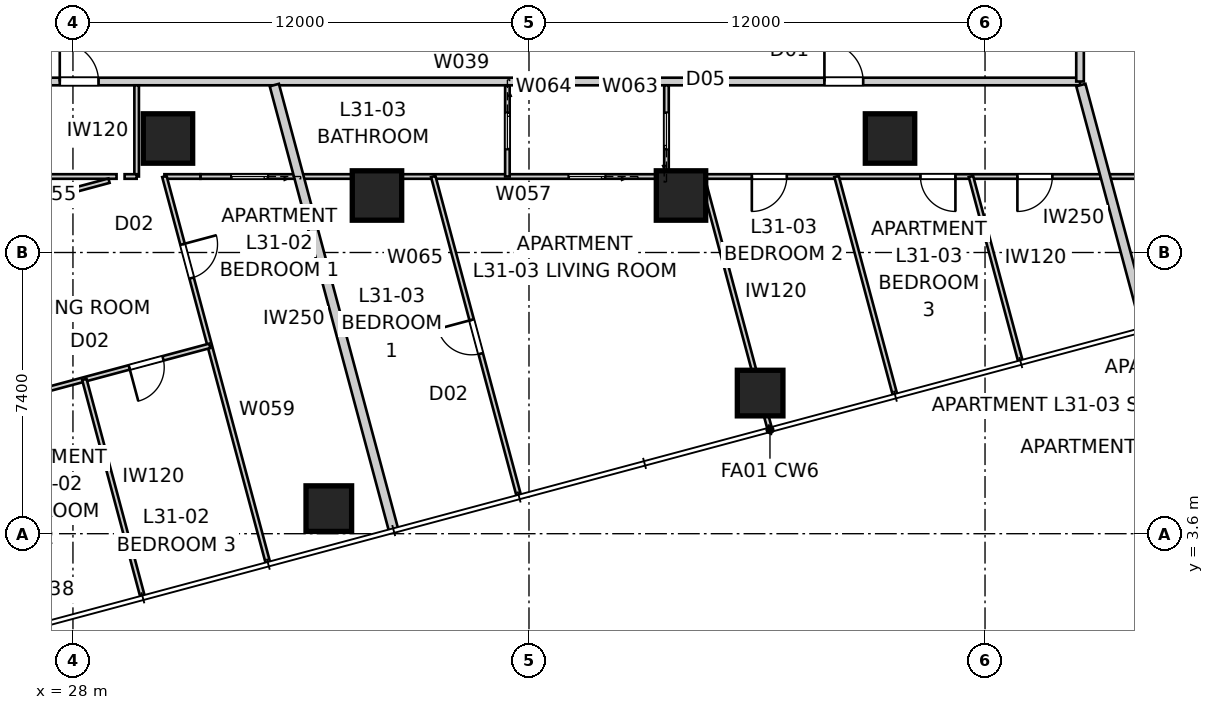
"""IFC4 building model, lengths in metres.
Left out: names, types, materials, properties, quantities, classifications, styles, units other than length and angle.
Written with IfcOpenShell. Run it as: python <this file> out.ifc"""

import sys

from ifc_helpers import new_model, si_unit, direction, frame, frame_2d, origin, origin_2d, place, context, subcontext, project, spatial, rectangle, extrude, element, fill, save


model = new_model("IFC4")
c1 = context("Model", 3, precision=1e-05, world=origin(), true_north=direction((0.0, 1.0)))
c2 = subcontext(c1, "Body", "Model", "MODEL_VIEW")
j1 = project(units=[si_unit("LENGTHUNIT", "METRE"), si_unit("PLANEANGLEUNIT", "RADIAN")], contexts=[c1])
p1 = place(None, origin())
s1 = spatial("IfcSite", under=j1, at=p1, CompositionType="ELEMENT")
p2 = place(p1, origin())
s2 = spatial("IfcBuilding", under=s1, at=p2, CompositionType="ELEMENT")
p3 = place(p2, frame((0.0, 0.0, 115.0)))
s3 = spatial("IfcBuildingStorey", under=s2, at=p3, CompositionType="ELEMENT", Elevation=115.0)
for number, where, z_axis, x_axis in (
    (1, (34.733, 4.26, 0.0), (0.0, 0.0, 1.0), (1.0, 0.0, 0.0)),
    (2, (46.082, 7.301, 0.0), (0.0, 0.0, 1.0), (1.0, 0.0, 0.0)),
):
    element("IfcColumn", number, at=place(p3, frame(where, z_axis=z_axis, x_axis=x_axis)), inside=s3, PredefinedType="COLUMN", context=c2, shape_type="SweptSolid", body=[
        extrude(rectangle(XDim=1.2, YDim=1.2, at=origin_2d()), origin(), (0.0, 0.0, 1.0), 3.4),
    ])
for number, where, z_axis, x_axis in (
    (3, (30.5, 14.0, 0.0), (0.0, 0.0, 1.0), (1.0, 0.0, 0.0)),
    (4, (36.0, 12.5, 0.0), (0.0, 0.0, 1.0), (1.0, 0.0, 0.0)),
    (5, (44.0, 12.5, 0.0), (0.0, 0.0, 1.0), (1.0, 0.0, 0.0)),
    (6, (49.5, 14.0, 0.0), (0.0, 0.0, 1.0), (1.0, 0.0, 0.0)),
):
    element("IfcColumn", number, at=place(p3, frame(where, z_axis=z_axis, x_axis=x_axis)), inside=s3, PredefinedType="COLUMN", context=c2, shape_type="SweptSolid", body=[
        extrude(rectangle(XDim=1.3, YDim=1.3, at=origin_2d()), origin(), (0.0, 0.0, 1.0), 3.4),
    ])
p4 = place(p3, frame((26.3, 15.5, 0.0), z_axis=(0.0, 0.0, 1.0), x_axis=(1.0, 0.0, 0.0)))
e7 = element("IfcWall", 7, at=p4, inside=s3, PredefinedType="PARTITIONING", context=c2, shape_type="SweptSolid", body=[
    extrude(rectangle(XDim=28.2, YDim=0.2, at=frame_2d((14.1, 0.0))), origin(), (0.0, 0.0, 1.0), 3.25),
])
p5 = place(p4, frame((21.474, 0.0, 0.0)))
e8 = element("IfcOpeningElement", 8, at=p5, cuts=e7, PredefinedType="OPENING", context=c2, shape_type="SweptSolid", body=[
    extrude(rectangle(XDim=1.02, YDim=2.34, at=frame_2d((0.51, 1.17))), frame((0.0, 0.11, 0.0), z_axis=(0.0, -1.0, 0.0), x_axis=(1.0, 0.0, 0.0)), (0.0, 0.0, 1.0), 0.22),
])
p6 = place(p4, frame((1.353, 0.0, 0.0)))
e9 = element("IfcOpeningElement", 9, at=p6, cuts=e7, PredefinedType="OPENING", context=c2, shape_type="SweptSolid", body=[
    extrude(rectangle(XDim=1.02, YDim=2.1, at=frame_2d((0.51, 1.05))), frame((0.0, 0.11, 0.0), z_axis=(0.0, -1.0, 0.0), x_axis=(1.0, 0.0, 0.0)), (0.0, 0.0, 1.0), 0.22),
])
p7 = place(p3, frame((54.5, 15.5, 0.0), z_axis=(0.0, 0.0, 1.0), x_axis=(0.0, 1.0, 0.0)))
e10 = element("IfcWall", 10, at=p7, inside=s3, PredefinedType="PARTITIONING", context=c2, shape_type="SweptSolid", body=[
    extrude(rectangle(XDim=29.0, YDim=0.2, at=frame_2d((14.5, 0.0))), origin(), (0.0, 0.0, 1.0), 3.25),
])
p8 = place(p7, frame((24.76, 0.0, 0.0)))
e11 = element("IfcOpeningElement", 11, at=p8, cuts=e10, PredefinedType="OPENING", context=c2, shape_type="SweptSolid", body=[
    extrude(rectangle(XDim=1.02, YDim=2.1, at=frame_2d((0.51, 1.05))), frame((0.0, 0.11, 0.0), z_axis=(0.0, -1.0, 0.0), x_axis=(1.0, 0.0, 0.0)), (0.0, 0.0, 1.0), 0.22),
])
p9 = place(p7, frame((5.829, 0.0, 0.0)))
e12 = element("IfcOpeningElement", 12, at=p9, cuts=e10, PredefinedType="OPENING", context=c2, shape_type="SweptSolid", body=[
    extrude(rectangle(XDim=1.02, YDim=2.34, at=frame_2d((0.51, 1.17))), frame((0.0, 0.11, 0.0), z_axis=(0.0, -1.0, 0.0), x_axis=(1.0, 0.0, 0.0)), (0.0, 0.0, 1.0), 0.22),
])
p10 = place(p7, frame((9.559, 0.0, 0.0)))
e13 = element("IfcOpeningElement", 13, at=p10, cuts=e10, PredefinedType="OPENING", context=c2, shape_type="SweptSolid", body=[
    extrude(rectangle(XDim=1.02, YDim=2.34, at=frame_2d((0.51, 1.17))), frame((0.0, 0.11, 0.0), z_axis=(0.0, -1.0, 0.0), x_axis=(1.0, 0.0, 0.0)), (0.0, 0.0, 1.0), 0.22),
])
p11 = place(p3, frame((36.44, 3.682, 0.0), z_axis=(0.0, 0.0, 1.0), x_axis=(-0.258824223352, 0.965924438766, 0.0)))
e14 = element("IfcWall", 14, at=p11, inside=s3, PredefinedType="PARTITIONING", context=c2, shape_type="SweptSolid", body=[
    extrude(rectangle(XDim=12.138, YDim=0.25, at=frame_2d((6.069, 0.0))), origin(), (0.0, 0.0, 1.0), 3.25),
])
p12 = place(p3, frame((56.242, 8.988, 0.0), z_axis=(0.0, 0.0, 1.0), x_axis=(-0.25880587229, 0.965929355837, 0.0)))
e15 = element("IfcWall", 15, at=p12, inside=s3, PredefinedType="PARTITIONING", context=c2, shape_type="SweptSolid", body=[
    extrude(rectangle(XDim=6.645, YDim=0.25, at=frame_2d((3.322, 0.0))), origin(), (0.0, 0.0, 1.0), 3.25),
])
p13 = place(p3, frame((29.676, 15.4, 0.0), z_axis=(0.0, 0.0, 1.0), x_axis=(0.0, -1.0, 0.0)))
e16 = element("IfcWall", 16, at=p13, inside=s3, PredefinedType="PARTITIONING", context=c2, shape_type="SweptSolid", body=[
    extrude(rectangle(XDim=2.4, YDim=0.12, at=frame_2d((1.2, 0.0))), origin(), (0.0, 0.0, 1.0), 3.25),
])
p14 = place(p3, frame((29.147, 13.0, 0.0), z_axis=(0.0, 0.0, 1.0), x_axis=(-1.0, 0.0, 0.0)))
e17 = element("IfcWall", 17, at=p14, inside=s3, PredefinedType="PARTITIONING", context=c2, shape_type="SweptSolid", body=[
    extrude(rectangle(XDim=6.147, YDim=0.12, at=frame_2d((3.074, 0.0))), origin(), (0.0, 0.0, 1.0), 3.25),
])
p15 = place(p14, frame((3.591, 0.0, 0.0)))
e18 = element("IfcOpeningElement", 18, at=p15, cuts=e17, PredefinedType="OPENING", context=c2, shape_type="SweptSolid", body=[
    extrude(rectangle(XDim=0.96, YDim=2.1, at=frame_2d((0.48, 1.05))), frame((0.0, 0.07, 0.0), z_axis=(0.0, -1.0, 0.0), x_axis=(1.0, 0.0, 0.0)), (0.0, 0.0, 1.0), 0.14),
])
p16 = place(p3, frame((55.046, 13.0, 0.0), z_axis=(0.0, 0.0, 1.0), x_axis=(-1.0, 0.0, 0.0)))
e19 = element("IfcWall", 19, at=p16, inside=s3, PredefinedType="PARTITIONING", context=c2, shape_type="SweptSolid", body=[
    extrude(rectangle(XDim=23.693, YDim=0.12, at=frame_2d((11.846, 0.0))), origin(), (0.0, 0.0, 1.0), 2.55),
])
p17 = place(p16, frame((8.262, 0.0, 0.0)))
e20 = element("IfcOpeningElement", 20, at=p17, cuts=e19, PredefinedType="OPENING", context=c2, shape_type="SweptSolid", body=[
    extrude(rectangle(XDim=0.92, YDim=2.34, at=frame_2d((0.46, 1.17))), frame((0.0, 0.07, 0.0), z_axis=(0.0, -1.0, 0.0), x_axis=(1.0, 0.0, 0.0)), (0.0, 0.0, 1.0), 0.14),
])
p18 = place(p16, frame((3.825, 0.0, 0.0)))
e21 = element("IfcOpeningElement", 21, at=p18, cuts=e19, PredefinedType="OPENING", context=c2, shape_type="SweptSolid", body=[
    extrude(rectangle(XDim=0.92, YDim=2.34, at=frame_2d((0.46, 1.17))), frame((0.0, 0.07, 0.0), z_axis=(0.0, -1.0, 0.0), x_axis=(1.0, 0.0, 0.0)), (0.0, 0.0, 1.0), 0.14),
])
p19 = place(p16, frame((1.274, 0.0, 0.0)))
e22 = element("IfcOpeningElement", 22, at=p19, cuts=e19, PredefinedType="OPENING", context=c2, shape_type="SweptSolid", body=[
    extrude(rectangle(XDim=0.92, YDim=2.34, at=frame_2d((0.46, 1.17))), frame((0.0, 0.07, 0.0), z_axis=(0.0, -1.0, 0.0), x_axis=(1.0, 0.0, 0.0)), (0.0, 0.0, 1.0), 0.14),
])
p20 = place(p16, frame((13.041, 0.0, 0.0)))
e23 = element("IfcOpeningElement", 23, at=p20, cuts=e19, PredefinedType="OPENING", context=c2, shape_type="SweptSolid", body=[
    extrude(rectangle(XDim=0.96, YDim=2.1, at=frame_2d((0.48, 1.05))), frame((0.0, 0.07, 0.0), z_axis=(0.0, -1.0, 0.0), x_axis=(1.0, 0.0, 0.0)), (0.0, 0.0, 1.0), 0.14),
])
p21 = place(p16, frame((21.917, 0.0, 0.0)))
e24 = element("IfcOpeningElement", 24, at=p21, cuts=e19, PredefinedType="OPENING", context=c2, shape_type="SweptSolid", body=[
    extrude(rectangle(XDim=0.96, YDim=2.1, at=frame_2d((0.48, 1.05))), frame((0.0, 0.07, 0.0), z_axis=(0.0, -1.0, 0.0), x_axis=(1.0, 0.0, 0.0)), (0.0, 0.0, 1.0), 0.14),
])
p22 = place(p3, frame((30.406, 13.0, 0.0), z_axis=(0.0, 0.0, 1.0), x_axis=(0.258797552287, -0.965931585015, 0.0)))
e25 = element("IfcWall", 25, at=p22, inside=s3, PredefinedType="PARTITIONING", context=c2, shape_type="SweptSolid", body=[
    extrude(rectangle(XDim=10.522, YDim=0.12, at=frame_2d((5.261, 0.0))), origin(), (0.0, 0.0, 1.0), 2.722),
])
p23 = place(p22, frame((1.846, 0.0, 0.0)))
e26 = element("IfcOpeningElement", 26, at=p23, cuts=e25, PredefinedType="OPENING", context=c2, shape_type="SweptSolid", body=[
    extrude(rectangle(XDim=0.92, YDim=2.34, at=frame_2d((0.46, 1.17))), frame((0.0, 0.07, 0.0), z_axis=(0.0, -1.0, 0.0), x_axis=(1.0, 0.0, 0.0)), (0.0, 0.0, 1.0), 0.14),
])
p24 = place(p3, frame((31.6, 8.544, 0.0), z_axis=(0.0, 0.0, 1.0), x_axis=(-0.965927151587, -0.258814098973, 0.0)))
e27 = element("IfcWall", 27, at=p24, inside=s3, PredefinedType="PARTITIONING", context=c2, shape_type="SweptSolid", body=[
    extrude(rectangle(XDim=10.793, YDim=0.12, at=frame_2d((5.396, 0.0))), origin(), (0.0, 0.0, 1.0), 3.25),
])
p25 = place(p24, frame((6.64, 0.0, 0.0)))
e28 = element("IfcOpeningElement", 28, at=p25, cuts=e27, PredefinedType="OPENING", context=c2, shape_type="SweptSolid", body=[
    extrude(rectangle(XDim=0.92, YDim=2.34, at=frame_2d((0.46, 1.17))), frame((0.0, 0.07, 0.0), z_axis=(0.0, -1.0, 0.0), x_axis=(1.0, 0.0, 0.0)), (0.0, 0.0, 1.0), 0.14),
])
p26 = place(p24, frame((1.273, 0.0, 0.0)))
e29 = element("IfcOpeningElement", 29, at=p26, cuts=e27, PredefinedType="OPENING", context=c2, shape_type="SweptSolid", body=[
    extrude(rectangle(XDim=0.92, YDim=2.34, at=frame_2d((0.46, 1.17))), frame((0.0, 0.07, 0.0), z_axis=(0.0, -1.0, 0.0), x_axis=(1.0, 0.0, 0.0)), (0.0, 0.0, 1.0), 0.14),
])
p27 = place(p3, frame((19.911, 10.468, 0.0), z_axis=(0.0, 0.0, 1.0), x_axis=(0.965927203676, 0.25881390457, 0.0)))
e30 = element("IfcWall", 30, at=p27, inside=s3, PredefinedType="PARTITIONING", context=c2, shape_type="SweptSolid", body=[
    extrude(rectangle(XDim=9.357, YDim=0.12, at=frame_2d((4.678, 0.0))), origin(), (0.0, 0.0, 1.0), 2.638),
])
p28 = place(p27, frame((4.391, 0.0, 0.0)))
e31 = element("IfcOpeningElement", 31, at=p28, cuts=e30, PredefinedType="OPENING", context=c2, shape_type="SweptSolid", body=[
    extrude(rectangle(XDim=0.96, YDim=2.1, at=frame_2d((0.48, 1.05))), frame((0.0, 0.07, 0.0), z_axis=(0.0, -1.0, 0.0), x_axis=(1.0, 0.0, 0.0)), (0.0, 0.0, 1.0), 0.14),
])
p29 = place(p3, frame((28.3, 7.66, 0.0), z_axis=(0.0, 0.0, 1.0), x_axis=(0.25882212607, -0.965925000741, 0.0)))
e32 = element("IfcWall", 32, at=p29, inside=s3, PredefinedType="PARTITIONING", context=c2, shape_type="SweptSolid", body=[
    extrude(rectangle(XDim=5.91, YDim=0.12, at=frame_2d((2.955, 0.0))), origin(), (0.0, 0.0, 1.0), 3.25),
])
p30 = place(p3, frame((43.618, 13.0, 0.0), z_axis=(0.0, 0.0, 1.0), x_axis=(0.0, 1.0, 0.0)))
e33 = element("IfcWall", 33, at=p30, inside=s3, PredefinedType="PARTITIONING", context=c2, shape_type="SweptSolid", body=[
    extrude(rectangle(XDim=2.4, YDim=0.12, at=frame_2d((1.2, 0.0))), origin(), (0.0, 0.0, 1.0), 3.25),
])
p31 = place(p30, frame((0.72, 0.0, 0.0)))
e34 = element("IfcOpeningElement", 34, at=p31, cuts=e33, PredefinedType="OPENING", context=c2, shape_type="SweptSolid", body=[
    extrude(rectangle(XDim=0.96, YDim=2.1, at=frame_2d((0.48, 1.05))), frame((0.0, 0.07, 0.0), z_axis=(0.0, -1.0, 0.0), x_axis=(1.0, 0.0, 0.0)), (0.0, 0.0, 1.0), 0.14),
])
p32 = place(p3, frame((39.432, 15.4, 0.0), z_axis=(0.0, 0.0, 1.0), x_axis=(0.0, -1.0, 0.0)))
e35 = element("IfcWall", 35, at=p32, inside=s3, PredefinedType="PARTITIONING", context=c2, shape_type="SweptSolid", body=[
    extrude(rectangle(XDim=2.4, YDim=0.12, at=frame_2d((1.2, 0.0))), origin(), (0.0, 0.0, 1.0), 3.25),
])
p33 = place(p32, frame((0.72, 0.0, 0.0)))
e36 = element("IfcOpeningElement", 36, at=p33, cuts=e35, PredefinedType="OPENING", context=c2, shape_type="SweptSolid", body=[
    extrude(rectangle(XDim=0.96, YDim=2.1, at=frame_2d((0.48, 1.05))), frame((0.0, 0.07, 0.0), z_axis=(0.0, -1.0, 0.0), x_axis=(1.0, 0.0, 0.0)), (0.0, 0.0, 1.0), 0.14),
])
p34 = place(p3, frame((39.73, 4.605, 0.0), z_axis=(0.0, 0.0, 1.0), x_axis=(-0.258819860698, 0.965925607751, 0.0)))
e37 = element("IfcWall", 37, at=p34, inside=s3, PredefinedType="PARTITIONING", context=c2, shape_type="SweptSolid", body=[
    extrude(rectangle(XDim=8.691, YDim=0.12, at=frame_2d((4.346, 0.0))), origin(), (0.0, 0.0, 1.0), 3.25),
])
p35 = place(p34, frame((3.866, 0.0, 0.0)))
e38 = element("IfcOpeningElement", 38, at=p35, cuts=e37, PredefinedType="OPENING", context=c2, shape_type="SweptSolid", body=[
    extrude(rectangle(XDim=0.92, YDim=2.34, at=frame_2d((0.46, 1.17))), frame((0.0, 0.07, 0.0), z_axis=(0.0, -1.0, 0.0), x_axis=(1.0, 0.0, 0.0)), (0.0, 0.0, 1.0), 0.14),
])
p36 = place(p3, frame((44.555, 13.0, 0.0), z_axis=(0.0, 0.0, 1.0), x_axis=(0.258829770556, -0.965922952349, 0.0)))
e39 = element("IfcWall", 39, at=p36, inside=s3, PredefinedType="PARTITIONING", context=c2, shape_type="SweptSolid", body=[
    extrude(rectangle(XDim=6.86, YDim=0.12, at=frame_2d((3.43, 0.0))), origin(), (0.0, 0.0, 1.0), 3.25),
])
p37 = place(p3, frame((48.092, 13.0, 0.0), z_axis=(0.0, 0.0, 1.0), x_axis=(0.258812722515, -0.965927520399, 0.0)))
e40 = element("IfcWall", 40, at=p37, inside=s3, PredefinedType="PARTITIONING", context=c2, shape_type="SweptSolid", body=[
    extrude(rectangle(XDim=5.945, YDim=0.12, at=frame_2d((2.972, 0.0))), origin(), (0.0, 0.0, 1.0), 3.25),
])
p38 = place(p3, frame((51.63, 13.0, 0.0), z_axis=(0.0, 0.0, 1.0), x_axis=(0.258789467631, -0.965933751063, 0.0)))
e41 = element("IfcWall", 41, at=p38, inside=s3, PredefinedType="PARTITIONING", context=c2, shape_type="SweptSolid", body=[
    extrude(rectangle(XDim=5.029, YDim=0.12, at=frame_2d((2.515, 0.0))), origin(), (0.0, 0.0, 1.0), 3.25),
])
p39 = place(p3, frame((57.0, 13.0, 0.0), z_axis=(0.0, 0.0, 1.0), x_axis=(-1.0, 0.0, 0.0)))
e42 = element("IfcWall", 42, at=p39, inside=s3, PredefinedType="PARTITIONING", context=c2, shape_type="SweptSolid", body=[
    extrude(rectangle(XDim=1.833, YDim=0.12, at=frame_2d((0.917, 0.0))), origin(), (0.0, 0.0, 1.0), 3.25),
])
p40 = place(p3, frame((29.676, 13.0, 0.0), z_axis=(0.0, 0.0, 1.0), x_axis=(-1.0, 0.0, 0.0)))
e43 = element("IfcWall", 43, at=p40, inside=s3, PredefinedType="PARTITIONING", context=c2, shape_type="SweptSolid", body=[
    extrude(rectangle(XDim=0.317, YDim=0.12, at=frame_2d((0.158, 0.0))), origin(), (0.0, 0.0, 1.0), 3.25),
])
p41 = place(p3, frame((31.354, 13.0, 0.0), z_axis=(0.0, 0.0, 1.0), x_axis=(-1.0, 0.0, 0.0)))
e44 = element("IfcWall", 44, at=p41, inside=s3, PredefinedType="PARTITIONING", context=c2, shape_type="SweptSolid", body=[
    extrude(rectangle(XDim=0.947, YDim=0.12, at=frame_2d((0.474, 0.0))), origin(), (0.0, 0.0, 1.0), 3.25),
])
p42 = place(p5, origin())
e45 = element("IfcDoor", 45, at=p42, inside=s3, OperationType="SINGLE_SWING_LEFT", PredefinedType="DOOR", context=c2, shape_type="SweptSolid", body=[
    extrude(rectangle(XDim=1.02, YDim=2.34, at=frame_2d((0.51, 1.17))), frame((0.0, 0.025, 0.0), z_axis=(0.0, -1.0, 0.0), x_axis=(1.0, 0.0, 0.0)), (0.0, 0.0, 1.0), 0.05),
])
fill(e8, e45)
p43 = place(p6, origin())
e46 = element("IfcDoor", 46, at=p43, inside=s3, OperationType="SINGLE_SWING_LEFT", PredefinedType="DOOR", context=c2, shape_type="SweptSolid", body=[
    extrude(rectangle(XDim=1.02, YDim=2.1, at=frame_2d((0.51, 1.05))), frame((0.0, 0.025, 0.0), z_axis=(0.0, -1.0, 0.0), x_axis=(1.0, 0.0, 0.0)), (0.0, 0.0, 1.0), 0.05),
])
fill(e9, e46)
p44 = place(p17, origin())
e47 = element("IfcDoor", 47, at=p44, inside=s3, OperationType="SINGLE_SWING_RIGHT", PredefinedType="DOOR", context=c2, shape_type="SweptSolid", body=[
    extrude(rectangle(XDim=0.92, YDim=2.34, at=frame_2d((0.46, 1.17))), frame((0.0, 0.025, 0.0), z_axis=(0.0, -1.0, 0.0), x_axis=(1.0, 0.0, 0.0)), (0.0, 0.0, 1.0), 0.05),
])
fill(e20, e47)
p45 = place(p18, origin())
e48 = element("IfcDoor", 48, at=p45, inside=s3, OperationType="SINGLE_SWING_LEFT", PredefinedType="DOOR", context=c2, shape_type="SweptSolid", body=[
    extrude(rectangle(XDim=0.92, YDim=2.34, at=frame_2d((0.46, 1.17))), frame((0.0, 0.025, 0.0), z_axis=(0.0, -1.0, 0.0), x_axis=(1.0, 0.0, 0.0)), (0.0, 0.0, 1.0), 0.05),
])
fill(e21, e48)
p46 = place(p19, origin())
e49 = element("IfcDoor", 49, at=p46, inside=s3, OperationType="SINGLE_SWING_RIGHT", PredefinedType="DOOR", context=c2, shape_type="SweptSolid", body=[
    extrude(rectangle(XDim=0.92, YDim=2.34, at=frame_2d((0.46, 1.17))), frame((0.0, 0.025, 0.0), z_axis=(0.0, -1.0, 0.0), x_axis=(1.0, 0.0, 0.0)), (0.0, 0.0, 1.0), 0.05),
])
fill(e22, e49)
p47 = place(p31, origin())
e50 = element("IfcDoor", 50, at=p47, inside=s3, OperationType="SLIDING_TO_LEFT", PredefinedType="DOOR", context=c2, shape_type="SweptSolid", body=[
    extrude(rectangle(XDim=0.96, YDim=2.1, at=frame_2d((0.48, 1.05))), frame((0.0, 0.025, 0.0), z_axis=(0.0, -1.0, 0.0), x_axis=(1.0, 0.0, 0.0)), (0.0, 0.0, 1.0), 0.05),
])
fill(e34, e50)
p48 = place(p20, origin())
e51 = element("IfcDoor", 51, at=p48, inside=s3, OperationType="SLIDING_TO_LEFT", PredefinedType="DOOR", context=c2, shape_type="SweptSolid", body=[
    extrude(rectangle(XDim=0.96, YDim=2.1, at=frame_2d((0.48, 1.05))), frame((0.0, 0.025, 0.0), z_axis=(0.0, -1.0, 0.0), x_axis=(1.0, 0.0, 0.0)), (0.0, 0.0, 1.0), 0.05),
])
fill(e23, e51)
p49 = place(p33, origin())
e52 = element("IfcDoor", 52, at=p49, inside=s3, OperationType="SLIDING_TO_LEFT", PredefinedType="DOOR", context=c2, shape_type="SweptSolid", body=[
    extrude(rectangle(XDim=0.96, YDim=2.1, at=frame_2d((0.48, 1.05))), frame((0.0, 0.025, 0.0), z_axis=(0.0, -1.0, 0.0), x_axis=(1.0, 0.0, 0.0)), (0.0, 0.0, 1.0), 0.05),
])
fill(e36, e52)
p50 = place(p35, origin())
e53 = element("IfcDoor", 53, at=p50, inside=s3, OperationType="SINGLE_SWING_RIGHT", PredefinedType="DOOR", context=c2, shape_type="SweptSolid", body=[
    extrude(rectangle(XDim=0.92, YDim=2.34, at=frame_2d((0.46, 1.17))), frame((0.0, 0.025, 0.0), z_axis=(0.0, -1.0, 0.0), x_axis=(1.0, 0.0, 0.0)), (0.0, 0.0, 1.0), 0.05),
])
fill(e38, e53)
p51 = place(p23, origin())
e54 = element("IfcDoor", 54, at=p51, inside=s3, OperationType="SINGLE_SWING_LEFT", PredefinedType="DOOR", context=c2, shape_type="SweptSolid", body=[
    extrude(rectangle(XDim=0.92, YDim=2.34, at=frame_2d((0.46, 1.17))), frame((0.0, 0.025, 0.0), z_axis=(0.0, -1.0, 0.0), x_axis=(1.0, 0.0, 0.0)), (0.0, 0.0, 1.0), 0.05),
])
fill(e26, e54)
p52 = place(p26, origin())
e55 = element("IfcDoor", 55, at=p52, inside=s3, OperationType="SINGLE_SWING_RIGHT", PredefinedType="DOOR", context=c2, shape_type="SweptSolid", body=[
    extrude(rectangle(XDim=0.92, YDim=2.34, at=frame_2d((0.46, 1.17))), frame((0.0, 0.025, 0.0), z_axis=(0.0, -1.0, 0.0), x_axis=(1.0, 0.0, 0.0)), (0.0, 0.0, 1.0), 0.05),
])
fill(e29, e55)
p53 = place(p21, origin())
e56 = element("IfcDoor", 56, at=p53, inside=s3, OperationType="SLIDING_TO_LEFT", PredefinedType="DOOR", context=c2, shape_type="SweptSolid", body=[
    extrude(rectangle(XDim=0.96, YDim=2.1, at=frame_2d((0.48, 1.05))), frame((0.0, 0.025, 0.0), z_axis=(0.0, -1.0, 0.0), x_axis=(1.0, 0.0, 0.0)), (0.0, 0.0, 1.0), 0.05),
])
fill(e24, e56)
save(model, sys.argv[1])
